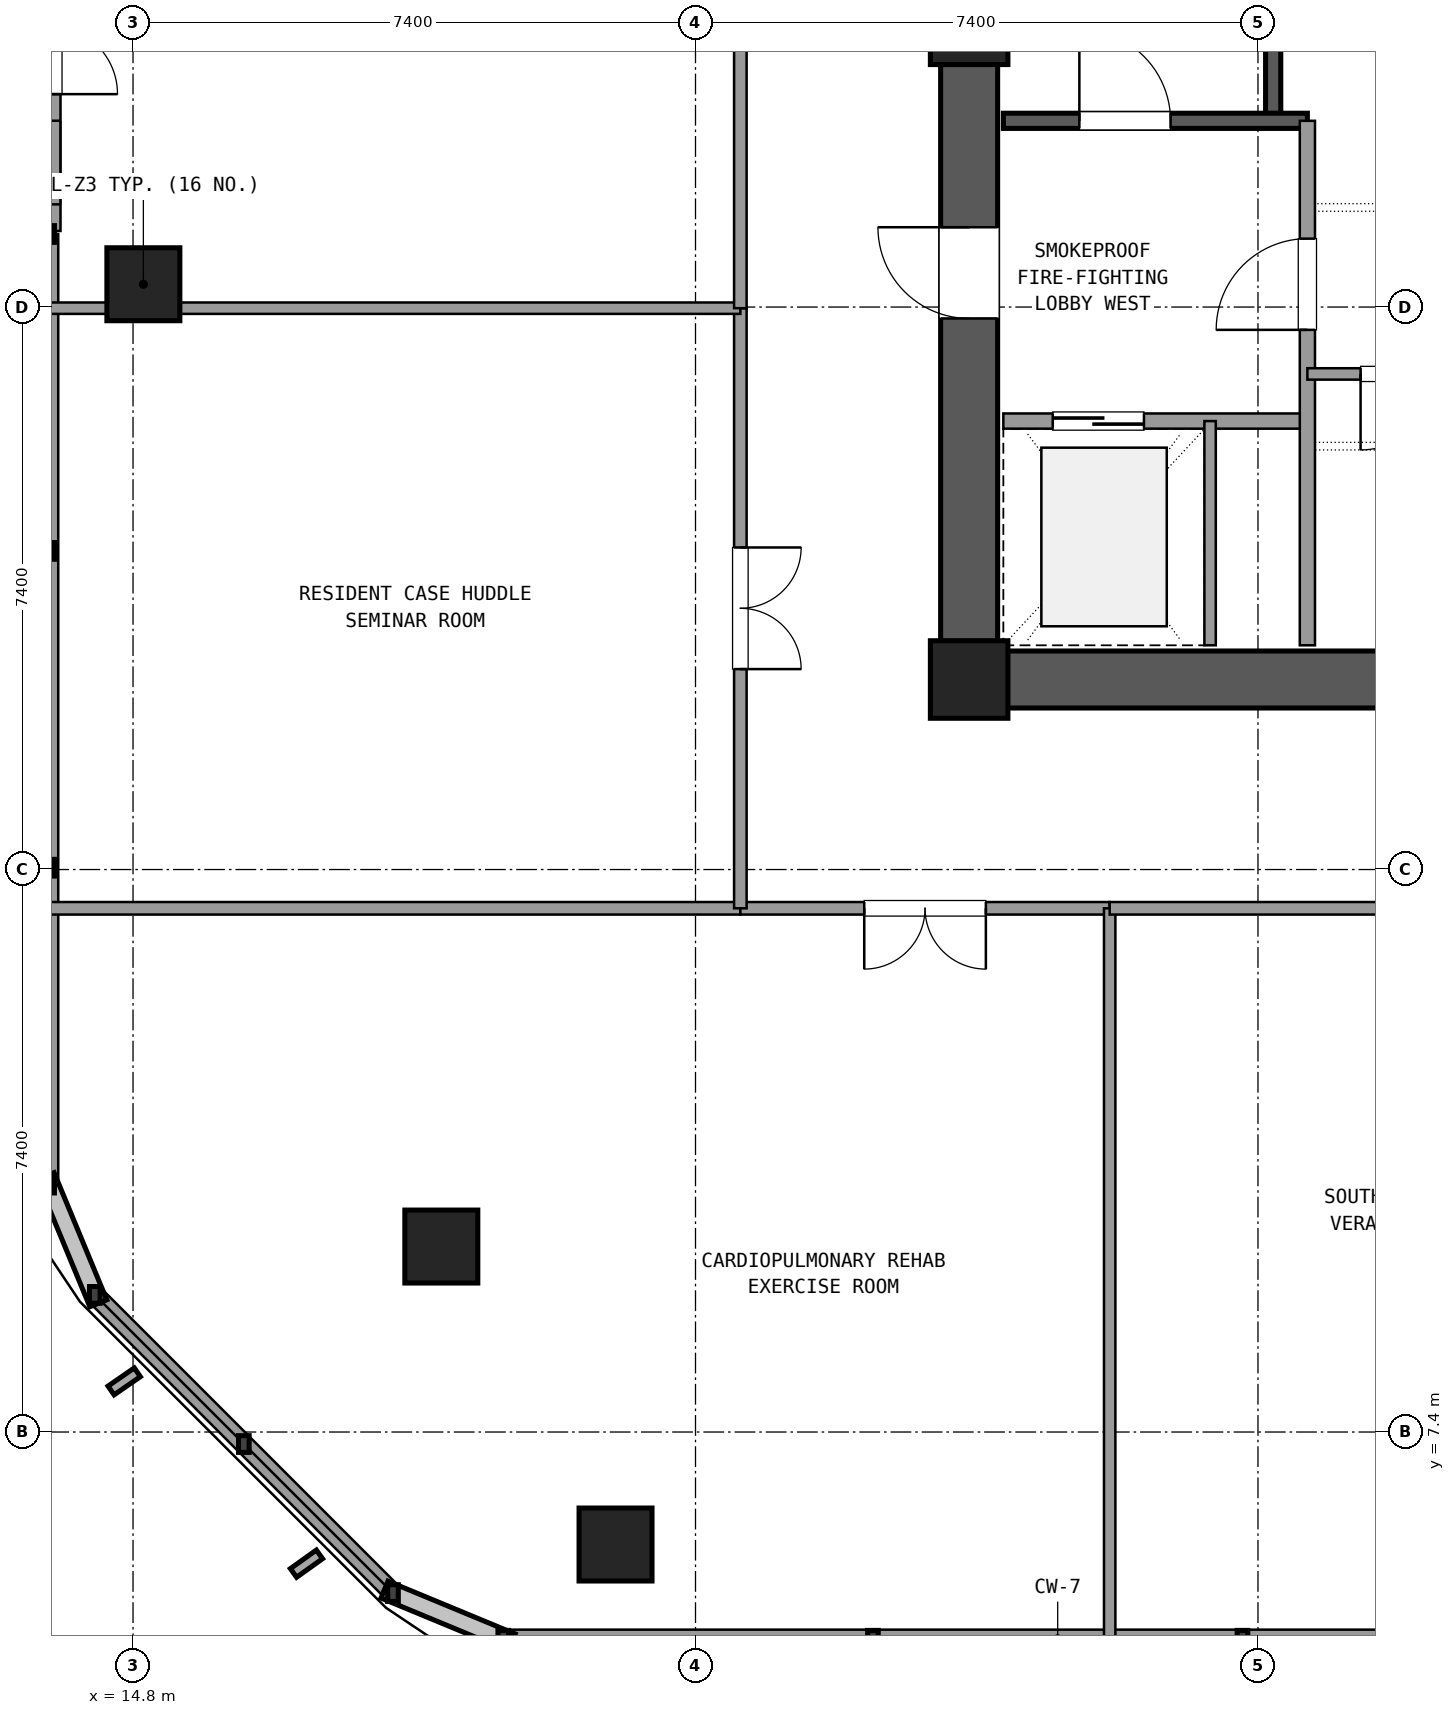
"""IFC4 building model, lengths in metres.
Left out: names, types, materials, properties, quantities, classifications, styles, units other than length and angle.
Written with IfcOpenShell. Run it as: python <this file> out.ifc"""

import sys

from ifc_helpers import new_model, si_unit, direction, frame, frame_2d, origin, origin_2d, place, context, subcontext, project, spatial, rectangle, extrude, element, fill, save


model = new_model("IFC4")
c1 = context("Model", 3, precision=1e-05, world=origin(), true_north=direction((0.0, 1.0)))
c2 = subcontext(c1, "Body", "Model", "MODEL_VIEW")
j1 = project(units=[si_unit("LENGTHUNIT", "METRE"), si_unit("PLANEANGLEUNIT", "RADIAN")], contexts=[c1])
p1 = place(None, origin())
s1 = spatial("IfcSite", under=j1, at=p1, CompositionType="ELEMENT")
p2 = place(p1, origin())
s2 = spatial("IfcBuilding", under=s1, at=p2, CompositionType="ELEMENT")
p3 = place(p2, frame((0.0, 0.0, 129.06)))
s3 = spatial("IfcBuildingStorey", under=s2, at=p3, CompositionType="ELEMENT", Elevation=129.06)
for number, where, z_axis, x_axis in (
    (1, (25.8, 17.3, 0.0), (0.0, 0.0, 1.0), (1.0, 0.0, 0.0)),
    (2, (25.8, 25.9, 0.0), (0.0, 0.0, 1.0), (1.0, 0.0, 0.0)),
):
    element("IfcColumn", number, at=place(p3, frame(where, z_axis=z_axis, x_axis=x_axis)), inside=s3, PredefinedType="COLUMN", context=c2, shape_type="SweptSolid", body=[
        extrude(rectangle(XDim=1.02, YDim=1.02, at=origin_2d()), origin(), (0.0, 0.0, 1.0), 5.76),
    ])
p4 = place(p3, frame((26.305, 17.3, 0.0), z_axis=(0.0, 0.0, 1.0), x_axis=(1.0, 0.0, 0.0)))
e3 = element("IfcWall", 3, at=p4, inside=s3, PredefinedType="SHEAR", context=c2, shape_type="SweptSolid", body=[
    extrude(rectangle(XDim=10.19, YDim=0.75, at=frame_2d((5.095, 0.0))), origin(), (0.0, 0.0, 1.0), 5.48),
])
p5 = place(p3, frame((25.8, 25.395, 0.0), z_axis=(0.0, 0.0, 1.0), x_axis=(0.0, -1.0, 0.0)))
e4 = element("IfcWall", 4, at=p5, inside=s3, PredefinedType="SHEAR", context=c2, shape_type="SweptSolid", body=[
    extrude(rectangle(XDim=7.59, YDim=0.75, at=frame_2d((3.795, 0.0))), origin(), (0.0, 0.0, 1.0), 5.48),
])
p6 = place(p5, frame((2.145, 0.0, 0.0)))
e5 = element("IfcOpeningElement", 5, at=p6, cuts=e4, PredefinedType="OPENING", context=c2, shape_type="SweptSolid", body=[
    extrude(rectangle(XDim=1.2, YDim=2.15, at=frame_2d((0.6, 1.075))), frame((0.0, 0.385, 0.0), z_axis=(0.0, -1.0, 0.0), x_axis=(1.0, 0.0, 0.0)), (0.0, 0.0, 1.0), 0.77),
])
p7 = place(p3, frame((14.936, 22.5, 0.021), z_axis=(0.0, 0.0, 1.0), x_axis=(1.0, 0.0, 0.0)))
e6 = element("IfcColumn", 6, at=p7, inside=s3, PredefinedType="COLUMN", context=c2, shape_type="SweptSolid", body=[
    extrude(rectangle(XDim=0.96, YDim=0.96, at=origin_2d()), origin(), (0.0, 0.0, 1.0), 5.739),
])
for number, where, z_axis, x_axis in (
    (7, (18.856, 9.84, 0.023), (0.0, 0.0, 1.0), (1.0, 0.0, 0.0)),
    (8, (21.148, 5.92, 0.023), (0.0, 0.0, 1.0), (1.0, 0.0, 0.0)),
):
    element("IfcColumn", number, at=place(p3, frame(where, z_axis=z_axis, x_axis=x_axis)), inside=s3, PredefinedType="COLUMN", context=c2, shape_type="SweptSolid", body=[
        extrude(rectangle(XDim=0.96, YDim=0.96, at=origin_2d()), origin(), (0.0, 0.0, 1.0), 5.737),
    ])
p8 = place(p3, frame((19.671, 4.68, 0.0), z_axis=(0.0, 0.0, 1.0), x_axis=(1.0, 0.0, 0.0)))
e9 = element("IfcWall", 9, at=p8, inside=s3, PredefinedType="SOLIDWALL", context=c2, shape_type="SweptSolid", body=[
    extrude(rectangle(XDim=14.588, YDim=0.24, at=frame_2d((7.294, 0.0))), origin(), (0.0, 0.0, 1.0), 0.85),
])
p9 = place(p3, frame((13.696, 28.601, 0.0), z_axis=(0.0, 0.0, 1.0), x_axis=(0.0, -1.0, 0.0)))
e10 = element("IfcWall", 10, at=p9, inside=s3, PredefinedType="SOLIDWALL", context=c2, shape_type="SweptSolid", body=[
    extrude(rectangle(XDim=5.4, YDim=0.3, at=frame_2d((2.7, 0.0))), origin(), (0.0, 0.0, 1.0), 4.83),
])
p10 = place(p9, frame((1.8, 0.0, 0.0)))
e11 = element("IfcOpeningElement", 11, at=p10, cuts=e10, PredefinedType="OPENING", context=c2, shape_type="SweptSolid", body=[
    extrude(rectangle(XDim=1.8, YDim=2.25, at=frame_2d((0.9, 1.125))), frame((0.0, 0.16, 0.0), z_axis=(0.0, -1.0, 0.0), x_axis=(1.0, 0.0, 0.0)), (0.0, 0.0, 1.0), 0.32),
])
p11 = place(p9, frame((0.35, 0.0, 0.4)))
e12 = element("IfcOpeningElement", 12, at=p11, cuts=e10, PredefinedType="OPENING", context=c2, shape_type="SweptSolid", body=[
    extrude(rectangle(XDim=1.1, YDim=1.8, at=frame_2d((0.55, 0.9))), frame((0.0, 0.16, 0.0), z_axis=(0.0, -1.0, 0.0), x_axis=(1.0, 0.0, 0.0)), (0.0, 0.0, 1.0), 0.32),
])
p12 = place(p9, frame((3.95, 0.0, 0.4)))
e13 = element("IfcOpeningElement", 13, at=p12, cuts=e10, PredefinedType="OPENING", context=c2, shape_type="SweptSolid", body=[
    extrude(rectangle(XDim=1.1, YDim=1.8, at=frame_2d((0.55, 0.9))), frame((0.0, 0.16, 0.0), z_axis=(0.0, -1.0, 0.0), x_axis=(1.0, 0.0, 0.0)), (0.0, 0.0, 1.0), 0.32),
])
p13 = place(p3, frame((13.696, 23.161, 0.0), z_axis=(0.0, 0.0, 1.0), x_axis=(0.0, -1.0, 0.0)))
e14 = element("IfcWall", 14, at=p13, inside=s3, PredefinedType="SOLIDWALL", context=c2, shape_type="SweptSolid", body=[
    extrude(rectangle(XDim=12.506, YDim=0.24, at=frame_2d((6.253, 0.0))), origin(), (0.0, 0.0, 1.0), 0.85),
])
p14 = place(p3, frame((14.297, 9.204, 0.0), z_axis=(0.0, 0.0, 1.0), x_axis=(0.707084777957, -0.707128783731, 0.0)))
e15 = element("IfcWall", 15, at=p14, inside=s3, PredefinedType="SOLIDWALL", context=c2, shape_type="SweptSolid", body=[
    extrude(rectangle(XDim=5.548, YDim=0.24, at=frame_2d((2.774, 0.0))), origin(), (0.0, 0.0, 1.0), 0.85),
])
p15 = place(p3, frame((29.8, 24.65, 0.0), z_axis=(0.0, 0.0, 1.0), x_axis=(0.0, 1.0, 0.0)))
e16 = element("IfcWall", 16, at=p15, inside=s3, PredefinedType="SHEAR", context=c2, shape_type="SweptSolid", body=[
    extrude(rectangle(XDim=9.4, YDim=0.2, at=frame_2d((4.7, 0.0))), origin(), (0.0, 0.0, 1.0), 5.48),
])
p16 = place(p3, frame((26.25, 24.65, 0.0), z_axis=(0.0, 0.0, 1.0), x_axis=(1.0, 0.0, 0.0)))
e17 = element("IfcWall", 17, at=p16, inside=s3, PredefinedType="SHEAR", context=c2, shape_type="SweptSolid", body=[
    extrude(rectangle(XDim=4.0, YDim=0.2, at=frame_2d((2.0, 0.0))), origin(), (0.0, 0.0, 1.0), 5.48),
])
p17 = place(p16, frame((1.0, 0.0, 0.0)))
e18 = element("IfcOpeningElement", 18, at=p17, cuts=e17, PredefinedType="OPENING", context=c2, shape_type="SweptSolid", body=[
    extrude(rectangle(XDim=1.2, YDim=2.15, at=frame_2d((0.6, 1.075))), frame((0.0, 0.11, 0.0), z_axis=(0.0, -1.0, 0.0), x_axis=(1.0, 0.0, 0.0)), (0.0, 0.0, 1.0), 0.22),
])
p18 = place(p3, frame((26.25, 20.7, 0.0), z_axis=(0.0, 0.0, 1.0), x_axis=(1.0, 0.0, 0.0)))
e19 = element("IfcWall", 19, at=p18, inside=s3, PredefinedType="SOLIDWALL", context=c2, shape_type="SweptSolid", body=[
    extrude(rectangle(XDim=4.0, YDim=0.2, at=frame_2d((2.0, 0.0))), origin(), (0.0, 0.0, 1.0), 4.77),
])
p19 = place(p18, frame((0.65, 0.0, 0.0)))
e20 = element("IfcOpeningElement", 20, at=p19, cuts=e19, PredefinedType="OPENING", context=c2, shape_type="SweptSolid", body=[
    extrude(rectangle(XDim=1.2, YDim=2.15, at=frame_2d((0.6, 1.075))), frame((0.0, 0.11, 0.0), z_axis=(0.0, -1.0, 0.0), x_axis=(1.0, 0.0, 0.0)), (0.0, 0.0, 1.0), 0.22),
])
p20 = place(p3, frame((30.25, 17.75, 0.0), z_axis=(0.0, 0.0, 1.0), x_axis=(0.0, 1.0, 0.0)))
e21 = element("IfcWall", 21, at=p20, inside=s3, PredefinedType="SOLIDWALL", context=c2, shape_type="SweptSolid", body=[
    extrude(rectangle(XDim=6.9, YDim=0.2, at=frame_2d((3.45, 0.0))), origin(), (0.0, 0.0, 1.0), 4.77),
])
p21 = place(p20, frame((4.15, 0.0, 0.0)))
e22 = element("IfcOpeningElement", 22, at=p21, cuts=e21, PredefinedType="OPENING", context=c2, shape_type="SweptSolid", body=[
    extrude(rectangle(XDim=1.2, YDim=2.15, at=frame_2d((0.6, 1.075))), frame((0.0, 0.11, 0.0), z_axis=(0.0, -1.0, 0.0), x_axis=(1.0, 0.0, 0.0)), (0.0, 0.0, 1.0), 0.22),
])
p22 = place(p3, frame((28.97, 17.75, 0.0), z_axis=(0.0, 0.0, 1.0), x_axis=(0.0, 1.0, 0.0)))
e23 = element("IfcWall", 23, at=p22, inside=s3, PredefinedType="PARTITIONING", context=c2, shape_type="SweptSolid", body=[
    extrude(rectangle(XDim=2.95, YDim=0.15, at=frame_2d((1.475, 0.0))), origin(), (0.0, 0.0, 1.0), 4.77),
])
p23 = place(p3, frame((30.25, 21.32, 0.0), z_axis=(0.0, 0.0, 1.0), x_axis=(1.0, 0.0, 0.0)))
e24 = element("IfcWall", 24, at=p23, inside=s3, PredefinedType="PARTITIONING", context=c2, shape_type="SweptSolid", body=[
    extrude(rectangle(XDim=7.0, YDim=0.15, at=frame_2d((3.5, 0.0))), origin(), (0.0, 0.0, 1.0), 4.77),
])
p24 = place(p23, frame((0.7, 0.0, 0.0)))
e25 = element("IfcOpeningElement", 25, at=p24, cuts=e24, PredefinedType="OPENING", context=c2, shape_type="SweptSolid", body=[
    extrude(rectangle(XDim=1.0, YDim=2.15, at=frame_2d((0.5, 1.075))), frame((0.0, 0.085, 0.0), z_axis=(0.0, -1.0, 0.0), x_axis=(1.0, 0.0, 0.0)), (0.0, 0.0, 1.0), 0.17),
])
p25 = place(p23, frame((5.5, 0.0, 0.0)))
e26 = element("IfcOpeningElement", 26, at=p25, cuts=e24, PredefinedType="OPENING", context=c2, shape_type="SweptSolid", body=[
    extrude(rectangle(XDim=1.0, YDim=2.15, at=frame_2d((0.5, 1.075))), frame((0.0, 0.085, 0.0), z_axis=(0.0, -1.0, 0.0), x_axis=(1.0, 0.0, 0.0)), (0.0, 0.0, 1.0), 0.17),
])
p26 = place(p3, frame((13.716, 14.29, 0.0), z_axis=(0.0, 0.0, 1.0), x_axis=(1.0, 0.0, 0.0)))
e27 = element("IfcWall", 27, at=p26, inside=s3, PredefinedType="PARTITIONING", context=c2, shape_type="SweptSolid", body=[
    extrude(rectangle(XDim=9.074, YDim=0.165, at=frame_2d((4.537, 0.0))), origin(), (0.0, 0.0, 1.0), 4.77),
])
p27 = place(p3, frame((22.79, 14.29, 0.0), z_axis=(0.0, 0.0, 1.0), x_axis=(1.0, 0.0, 0.0)))
e28 = element("IfcWall", 28, at=p27, inside=s3, PredefinedType="PARTITIONING", context=c2, shape_type="SweptSolid", body=[
    extrude(rectangle(XDim=4.859, YDim=0.165, at=frame_2d((2.429, 0.0))), origin(), (0.0, 0.0, 1.0), 4.77),
])
p28 = place(p27, frame((1.63, 0.0, 0.0)))
e29 = element("IfcOpeningElement", 29, at=p28, cuts=e28, PredefinedType="OPENING", context=c2, shape_type="SweptSolid", body=[
    extrude(rectangle(XDim=1.6, YDim=2.2, at=frame_2d((0.8, 1.1))), frame((0.0, 0.093, 0.0), z_axis=(0.0, -1.0, 0.0), x_axis=(1.0, 0.0, 0.0)), (0.0, 0.0, 1.0), 0.185),
])
p29 = place(p3, frame((27.649, 14.29, 0.0), z_axis=(0.0, 0.0, 1.0), x_axis=(0.0, -1.0, 0.0)))
e30 = element("IfcWall", 30, at=p29, inside=s3, PredefinedType="PARTITIONING", context=c2, shape_type="SweptSolid", body=[
    extrude(rectangle(XDim=9.59, YDim=0.15, at=frame_2d((4.795, 0.0))), origin(), (0.0, 0.0, 1.0), 4.77),
])
p30 = place(p3, frame((27.649, 14.29, 0.0), z_axis=(0.0, 0.0, 1.0), x_axis=(1.0, 0.0, 0.0)))
e31 = element("IfcWall", 31, at=p30, inside=s3, PredefinedType="PARTITIONING", context=c2, shape_type="SweptSolid", body=[
    extrude(rectangle(XDim=17.366, YDim=0.165, at=frame_2d((8.683, 0.0))), origin(), (0.0, 0.0, 1.0), 4.77),
])
p31 = place(p30, frame((7.38, 0.0, 0.0)))
e32 = element("IfcOpeningElement", 32, at=p31, cuts=e31, PredefinedType="OPENING", context=c2, shape_type="SweptSolid", body=[
    extrude(rectangle(XDim=1.6, YDim=2.2, at=frame_2d((0.8, 1.1))), frame((0.0, 0.093, 0.0), z_axis=(0.0, -1.0, 0.0), x_axis=(1.0, 0.0, 0.0)), (0.0, 0.0, 1.0), 0.185),
])
p32 = place(p3, frame((22.79, 14.29, 0.0), z_axis=(0.0, 0.0, 1.0), x_axis=(0.0, 1.0, 0.0)))
e33 = element("IfcWall", 33, at=p32, inside=s3, PredefinedType="PARTITIONING", context=c2, shape_type="SweptSolid", body=[
    extrude(rectangle(XDim=7.895, YDim=0.165, at=frame_2d((3.948, 0.0))), origin(), (0.0, 0.0, 1.0), 4.77),
])
p33 = place(p32, frame((3.147, 0.0, 0.0)))
e34 = element("IfcOpeningElement", 34, at=p33, cuts=e33, PredefinedType="OPENING", context=c2, shape_type="SweptSolid", body=[
    extrude(rectangle(XDim=1.6, YDim=2.2, at=frame_2d((0.8, 1.1))), frame((0.0, 0.093, 0.0), z_axis=(0.0, -1.0, 0.0), x_axis=(1.0, 0.0, 0.0)), (0.0, 0.0, 1.0), 0.185),
])
p34 = place(p3, frame((22.79, 22.185, 0.0), z_axis=(0.0, 0.0, 1.0), x_axis=(-1.0, 0.0, 0.0)))
e35 = element("IfcWall", 35, at=p34, inside=s3, PredefinedType="PARTITIONING", context=c2, shape_type="SweptSolid", body=[
    extrude(rectangle(XDim=9.074, YDim=0.15, at=frame_2d((4.537, 0.0))), origin(), (0.0, 0.0, 1.0), 4.77),
])
p35 = place(p3, frame((22.79, 22.185, 0.0), z_axis=(0.0, 0.0, 1.0), x_axis=(0.0, 1.0, 0.0)))
e36 = element("IfcWall", 36, at=p35, inside=s3, PredefinedType="PARTITIONING", context=c2, shape_type="SweptSolid", body=[
    extrude(rectangle(XDim=8.823, YDim=0.165, at=frame_2d((4.412, 0.0))), origin(), (0.0, 0.0, 1.0), 4.77),
])
p36 = place(p35, frame((3.612, 0.0, 0.0)))
e37 = element("IfcOpeningElement", 37, at=p36, cuts=e36, PredefinedType="OPENING", context=c2, shape_type="SweptSolid", body=[
    extrude(rectangle(XDim=1.6, YDim=2.2, at=frame_2d((0.8, 1.1))), frame((0.0, 0.093, 0.0), z_axis=(0.0, -1.0, 0.0), x_axis=(1.0, 0.0, 0.0)), (0.0, 0.0, 1.0), 0.185),
])
p37 = place(p17, origin())
e38 = element("IfcDoor", 38, at=p37, inside=s3, OperationType="SINGLE_SWING_LEFT", PredefinedType="DOOR", context=c2, shape_type="SweptSolid", body=[
    extrude(rectangle(XDim=1.2, YDim=2.15, at=frame_2d((0.6, 1.075))), frame((0.0, 0.025, 0.0), z_axis=(0.0, -1.0, 0.0), x_axis=(1.0, 0.0, 0.0)), (0.0, 0.0, 1.0), 0.05),
])
fill(e18, e38)
p38 = place(p19, origin())
e39 = element("IfcDoor", 39, at=p38, inside=s3, OperationType="SLIDING_TO_LEFT", PredefinedType="DOOR", context=c2, shape_type="SweptSolid", body=[
    extrude(rectangle(XDim=1.2, YDim=2.15, at=frame_2d((0.6, 1.075))), frame((0.0, 0.025, 0.0), z_axis=(0.0, -1.0, 0.0), x_axis=(1.0, 0.0, 0.0)), (0.0, 0.0, 1.0), 0.05),
])
fill(e20, e39)
p39 = place(p21, origin())
e40 = element("IfcDoor", 40, at=p39, inside=s3, OperationType="SINGLE_SWING_LEFT", PredefinedType="DOOR", context=c2, shape_type="SweptSolid", body=[
    extrude(rectangle(XDim=1.2, YDim=2.15, at=frame_2d((0.6, 1.075))), frame((0.0, 0.025, 0.0), z_axis=(0.0, -1.0, 0.0), x_axis=(1.0, 0.0, 0.0)), (0.0, 0.0, 1.0), 0.05),
])
fill(e22, e40)
p40 = place(p6, frame((1.2, 0.0, 0.0), z_axis=(0.0, 0.0, 1.0), x_axis=(-1.0, 0.0, 0.0)))
e41 = element("IfcDoor", 41, at=p40, inside=s3, OperationType="SINGLE_SWING_LEFT", PredefinedType="DOOR", context=c2, shape_type="SweptSolid", body=[
    extrude(rectangle(XDim=1.2, YDim=2.15, at=frame_2d((0.6, 1.075))), frame((0.0, 0.025, 0.0), z_axis=(0.0, -1.0, 0.0), x_axis=(1.0, 0.0, 0.0)), (0.0, 0.0, 1.0), 0.05),
])
fill(e5, e41)
p41 = place(p24, frame((1.0, 0.0, 0.0), z_axis=(0.0, 0.0, 1.0), x_axis=(-1.0, 0.0, 0.0)))
e42 = element("IfcDoor", 42, at=p41, inside=s3, OperationType="SINGLE_SWING_LEFT", PredefinedType="DOOR", context=c2, shape_type="SweptSolid", body=[
    extrude(rectangle(XDim=1.0, YDim=2.15, at=frame_2d((0.5, 1.075))), frame((0.0, 0.025, 0.0), z_axis=(0.0, -1.0, 0.0), x_axis=(1.0, 0.0, 0.0)), (0.0, 0.0, 1.0), 0.05),
])
fill(e25, e42)
p42 = place(p28, frame((1.6, 0.0, 0.0), z_axis=(0.0, 0.0, 1.0), x_axis=(-1.0, 0.0, 0.0)))
e43 = element("IfcDoor", 43, at=p42, inside=s3, OperationType="DOUBLE_DOOR_SINGLE_SWING", PredefinedType="DOOR", context=c2, shape_type="SweptSolid", body=[
    extrude(rectangle(XDim=1.6, YDim=2.2, at=frame_2d((0.8, 1.1))), frame((0.0, 0.025, 0.0), z_axis=(0.0, -1.0, 0.0), x_axis=(1.0, 0.0, 0.0)), (0.0, 0.0, 1.0), 0.05),
])
fill(e29, e43)
p43 = place(p33, frame((1.6, 0.0, 0.0), z_axis=(0.0, 0.0, 1.0), x_axis=(-1.0, 0.0, 0.0)))
e44 = element("IfcDoor", 44, at=p43, inside=s3, OperationType="DOUBLE_DOOR_SINGLE_SWING", PredefinedType="DOOR", context=c2, shape_type="SweptSolid", body=[
    extrude(rectangle(XDim=1.6, YDim=2.2, at=frame_2d((0.8, 1.1))), frame((0.0, 0.025, 0.0), z_axis=(0.0, -1.0, 0.0), x_axis=(1.0, 0.0, 0.0)), (0.0, 0.0, 1.0), 0.05),
])
fill(e34, e44)
save(model, sys.argv[1])
